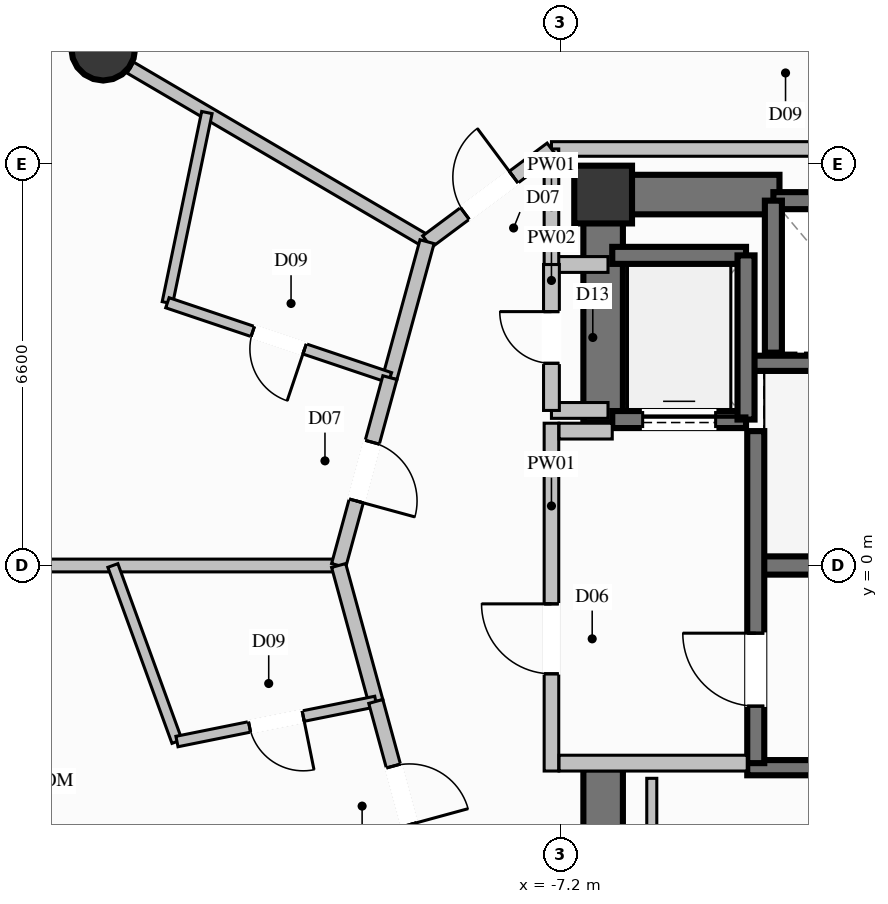
"""IFC4 building model, lengths in metres.
Left out: names, types, materials, properties, quantities, classifications, styles, units other than length and angle.
Written with IfcOpenShell. Run it as: python <this file> out.ifc"""

import sys

from ifc_helpers import new_model, si_unit, direction, frame, frame_2d, origin, origin_2d, place, context, subcontext, project, spatial, rectangle, circle, extrude, element, fill, save


model = new_model("IFC4")
c1 = context("Model", 3, precision=1e-05, world=origin(), true_north=direction((0.0, 1.0)))
c2 = subcontext(c1, "Body", "Model", "MODEL_VIEW")
j1 = project(units=[si_unit("LENGTHUNIT", "METRE"), si_unit("PLANEANGLEUNIT", "RADIAN")], contexts=[c1])
p1 = place(None, origin())
s1 = spatial("IfcSite", under=j1, at=p1, CompositionType="ELEMENT")
p2 = place(p1, origin())
s2 = spatial("IfcBuilding", under=s1, at=p2, CompositionType="ELEMENT")
p3 = place(p2, frame((0.0, 0.0, 102.6)))
s3 = spatial("IfcBuildingStorey", under=s2, at=p3, CompositionType="ELEMENT", Elevation=102.6)
p4 = place(p3, frame((-6.5, 6.1, 0.0), z_axis=(0.0, 0.0, 1.0), x_axis=(1.0, 0.0, 0.0)))
e1 = element("IfcColumn", 1, at=p4, inside=s3, PredefinedType="COLUMN", context=c2, shape_type="SweptSolid", body=[
    extrude(rectangle(XDim=0.95, YDim=0.95, at=origin_2d()), origin(), (0.0, 0.0, 1.0), 3.6),
])
p5 = place(p3, frame((-3.99, 0.0, 0.0), z_axis=(0.0, 0.0, 1.0), x_axis=(1.0, 0.0, 0.0)))
e2 = element("IfcWall", 2, at=p5, inside=s3, PredefinedType="SHEAR", context=c2, shape_type="SweptSolid", body=[
    extrude(rectangle(XDim=7.98, YDim=0.3, at=frame_2d((3.99, 0.0))), origin(), (0.0, 0.0, 1.0), 3.6),
])
for number, where, z_axis, x_axis in (
    (3, (-4.13, -3.325, 0.0), (0.0, 0.0, 1.0), (1.0, 0.0, 0.0)),
    (4, (-4.13, 3.325, 0.0), (0.0, 0.0, 1.0), (1.0, 0.0, 0.0)),
):
    element("IfcWall", number, at=place(p3, frame(where, z_axis=z_axis, x_axis=x_axis)), inside=s3, PredefinedType="SOLIDWALL", context=c2, shape_type="SweptSolid", body=[
        extrude(rectangle(XDim=8.26, YDim=0.25, at=frame_2d((4.13, 0.0))), origin(), (0.0, 0.0, 1.0), 3.6),
    ])
p6 = place(p3, frame((-6.175, 6.1, 0.0), z_axis=(0.0, 0.0, 1.0), x_axis=(1.0, 0.0, 0.0)))
e5 = element("IfcWall", 5, at=p6, inside=s3, PredefinedType="SHEAR", context=c2, shape_type="SweptSolid", body=[
    extrude(rectangle(XDim=2.575, YDim=0.65, at=frame_2d((1.288, 0.0))), origin(), (0.0, 0.0, 1.0), 3.6),
])
p7 = place(p3, frame((-6.5, 2.35, 0.0), z_axis=(0.0, 0.0, 1.0), x_axis=(0.0, 1.0, 0.0)))
e6 = element("IfcWall", 6, at=p7, inside=s3, PredefinedType="SHEAR", context=c2, shape_type="SweptSolid", body=[
    extrude(rectangle(XDim=4.075, YDim=0.65, at=frame_2d((2.038, 0.0))), origin(), (0.0, 0.0, 1.0), 3.6),
])
p8 = place(p3, frame((-6.5, -6.425, 0.0), z_axis=(0.0, 0.0, 1.0), x_axis=(0.0, 1.0, 0.0)))
e7 = element("IfcWall", 7, at=p8, inside=s3, PredefinedType="SHEAR", context=c2, shape_type="SweptSolid", body=[
    extrude(rectangle(XDim=3.075, YDim=0.65, at=frame_2d((1.538, 0.0))), origin(), (0.0, 0.0, 1.0), 3.6),
])
p9 = place(p3, frame((-14.722, 8.5, 0.0), z_axis=(0.0, 0.0, 1.0), x_axis=(1.0, 0.0, 0.0)))
e8 = element("IfcColumn", 8, at=p9, inside=s3, PredefinedType="COLUMN", context=c2, shape_type="SweptSolid", body=[
    extrude(circle(Radius=0.525, at=origin_2d()), origin(), (0.0, 0.0, 1.0), 3.6),
])
p10 = place(p3, frame((-1.6, 6.0, 0.0), z_axis=(0.0, 0.0, 1.0), x_axis=(-1.0, 0.0, 0.0)))
e9 = element("IfcWall", 9, at=p10, inside=s3, PredefinedType="SOLIDWALL", context=c2, shape_type="SweptSolid", body=[
    extrude(rectangle(XDim=2.1, YDim=0.28, at=frame_2d((1.05, 0.0))), origin(), (0.0, 0.0, 1.0), 3.35),
])
p11 = place(p3, frame((-3.7, 6.0, 0.0), z_axis=(0.0, 0.0, 1.0), x_axis=(0.0, -1.0, 0.0)))
e10 = element("IfcWall", 10, at=p11, inside=s3, PredefinedType="SOLIDWALL", context=c2, shape_type="SweptSolid", body=[
    extrude(rectangle(XDim=2.5, YDim=0.28, at=frame_2d((1.25, 0.0))), origin(), (0.0, 0.0, 1.0), 3.35),
])
p12 = place(p3, frame((-6.35, 2.4, 0.0), z_axis=(0.0, 0.0, 1.0), x_axis=(1.0, 0.0, 0.0)))
e11 = element("IfcWall", 11, at=p12, inside=s3, PredefinedType="SOLIDWALL", context=c2, shape_type="SweptSolid", body=[
    extrude(rectangle(XDim=2.2, YDim=0.28, at=frame_2d((1.1, 0.0))), origin(), (0.0, 0.0, 1.0), 3.35),
])
p13 = place(p12, frame((0.5, 0.0, 0.0)))
e12 = element("IfcOpeningElement", 12, at=p13, cuts=e11, PredefinedType="OPENING", context=c2, shape_type="SweptSolid", body=[
    extrude(rectangle(XDim=1.2, YDim=2.2, at=frame_2d((0.6, 1.1))), frame((0.0, 0.15, 0.0), z_axis=(0.0, -1.0, 0.0), x_axis=(1.0, 0.0, 0.0)), (0.0, 0.0, 1.0), 0.3),
])
p14 = place(p3, frame((-4.15, 5.1, 0.0), z_axis=(0.0, 0.0, 1.0), x_axis=(-1.0, 0.0, 0.0)))
e13 = element("IfcWall", 13, at=p14, inside=s3, PredefinedType="SOLIDWALL", context=c2, shape_type="SweptSolid", body=[
    extrude(rectangle(XDim=2.2, YDim=0.28, at=frame_2d((1.1, 0.0))), origin(), (0.0, 0.0, 1.0), 3.35),
])
p15 = place(p3, frame((-4.15, 2.4, 0.0), z_axis=(0.0, 0.0, 1.0), x_axis=(0.0, 1.0, 0.0)))
e14 = element("IfcWall", 14, at=p15, inside=s3, PredefinedType="SOLIDWALL", context=c2, shape_type="SweptSolid", body=[
    extrude(rectangle(XDim=2.7, YDim=0.28, at=frame_2d((1.35, 0.0))), origin(), (0.0, 0.0, 1.0), 3.35),
])
p16 = place(p3, frame((-3.99, -3.25, 0.0), z_axis=(0.0, 0.0, 1.0), x_axis=(0.0, 1.0, 0.0)))
e15 = element("IfcWall", 15, at=p16, inside=s3, PredefinedType="SOLIDWALL", context=c2, shape_type="SweptSolid", body=[
    extrude(rectangle(XDim=5.46, YDim=0.28, at=frame_2d((2.73, 0.0))), origin(), (0.0, 0.0, 1.0), 3.35),
])
p17 = place(p16, frame((0.937, 0.0, 0.0)))
e16 = element("IfcOpeningElement", 16, at=p17, cuts=e15, PredefinedType="OPENING", context=c2, shape_type="SweptSolid", body=[
    extrude(rectangle(XDim=1.2, YDim=2.2, at=frame_2d((0.6, 1.1))), frame((0.0, 0.15, 0.0), z_axis=(0.0, -1.0, 0.0), x_axis=(1.0, 0.0, 0.0)), (0.0, 0.0, 1.0), 0.3),
])
p18 = place(p3, frame((-7.35, -3.38, 0.0), z_axis=(0.0, 0.0, 1.0), x_axis=(0.0, 1.0, 0.0)))
e17 = element("IfcWall", 17, at=p18, inside=s3, PredefinedType="PARTITIONING", context=c2, shape_type="SweptSolid", body=[
    extrude(rectangle(XDim=5.72, YDim=0.24, at=frame_2d((2.86, 0.0))), origin(), (0.0, 0.0, 1.0), 2.435),
])
p19 = place(p18, frame((1.599, 0.0, 0.0)))
e18 = element("IfcOpeningElement", 18, at=p19, cuts=e17, PredefinedType="OPENING", context=c2, shape_type="SweptSolid", body=[
    extrude(rectangle(XDim=1.15, YDim=2.2, at=frame_2d((0.575, 1.1))), frame((0.0, 0.13, 0.0), z_axis=(0.0, -1.0, 0.0), x_axis=(1.0, 0.0, 0.0)), (0.0, 0.0, 1.0), 0.26),
])
p20 = place(p3, frame((-7.225, -3.25, 0.0), z_axis=(0.0, 0.0, 1.0), x_axis=(1.0, 0.0, 0.0)))
e19 = element("IfcWall", 19, at=p20, inside=s3, PredefinedType="PARTITIONING", context=c2, shape_type="SweptSolid", body=[
    extrude(rectangle(XDim=3.095, YDim=0.26, at=frame_2d((1.548, 0.0))), origin(), (0.0, 0.0, 1.0), 3.35),
])
p21 = place(p3, frame((-7.225, 2.21, 0.0), z_axis=(0.0, 0.0, 1.0), x_axis=(1.0, 0.0, 0.0)))
e20 = element("IfcWall", 20, at=p21, inside=s3, PredefinedType="PARTITIONING", context=c2, shape_type="SweptSolid", body=[
    extrude(rectangle(XDim=0.875, YDim=0.26, at=frame_2d((0.438, 0.0))), origin(), (0.0, 0.0, 1.0), 3.35),
])
for number, where, z_axis, x_axis in (
    (21, (-7.35, 4.95, 0.0), (0.0, 0.0, 1.0), (1.0, 0.0, 0.0)),
    (22, (-7.35, 2.55, 0.0), (0.0, 0.0, 1.0), (1.0, 0.0, 0.0)),
):
    element("IfcWall", number, at=place(p3, frame(where, z_axis=z_axis, x_axis=x_axis)), inside=s3, PredefinedType="PARTITIONING", context=c2, shape_type="SweptSolid", body=[
        extrude(rectangle(XDim=0.93, YDim=0.26, at=frame_2d((0.465, 0.0))), origin(), (0.0, 0.0, 1.0), 3.35),
    ])
p22 = place(p3, frame((-7.35, 2.55, 0.0), z_axis=(0.0, 0.0, 1.0), x_axis=(0.0, 1.0, 0.0)))
e23 = element("IfcWall", 23, at=p22, inside=s3, PredefinedType="PARTITIONING", context=c2, shape_type="SweptSolid", body=[
    extrude(rectangle(XDim=2.4, YDim=0.26, at=frame_2d((1.2, 0.0))), origin(), (0.0, 0.0, 1.0), 2.435),
])
p23 = place(p22, frame((0.775, 0.0, 0.0)))
e24 = element("IfcOpeningElement", 24, at=p23, cuts=e23, PredefinedType="OPENING", context=c2, shape_type="SweptSolid", body=[
    extrude(rectangle(XDim=0.85, YDim=2.05, at=frame_2d((0.425, 1.025))), frame((0.0, 0.14, 0.0), z_axis=(0.0, -1.0, 0.0), x_axis=(1.0, 0.0, 0.0)), (0.0, 0.0, 1.0), 0.28),
])
p24 = place(p3, frame((-7.35, 6.85, 0.0), z_axis=(0.0, 0.0, 1.0), x_axis=(1.0, 0.0, 0.0)))
e25 = element("IfcWall", 25, at=p24, inside=s3, PredefinedType="PARTITIONING", context=c2, shape_type="SweptSolid", body=[
    extrude(rectangle(XDim=14.7, YDim=0.24, at=frame_2d((7.35, 0.0))), origin(), (0.0, 0.0, 1.0), 2.435),
])
p25 = place(p3, frame((-7.35, 4.95, 0.0), z_axis=(0.0, 0.0, 1.0), x_axis=(0.0, 1.0, 0.0)))
e26 = element("IfcWall", 26, at=p25, inside=s3, PredefinedType="PARTITIONING", context=c2, shape_type="SweptSolid", body=[
    extrude(rectangle(XDim=1.9, YDim=0.24, at=frame_2d((0.95, 0.0))), origin(), (0.0, 0.0, 1.0), 2.435),
])
p26 = place(p3, frame((-5.7, -3.5, 0.0), z_axis=(0.0, 0.0, 1.0), x_axis=(0.0, -1.0, 0.0)))
e27 = element("IfcWall", 27, at=p26, inside=s3, PredefinedType="PARTITIONING", context=c2, shape_type="SweptSolid", body=[
    extrude(rectangle(XDim=3.35, YDim=0.165, at=frame_2d((1.675, 0.0))), origin(), (0.0, 0.0, 1.0), 2.435),
])
p27 = place(p3, frame((-9.396, 5.325, 0.0), z_axis=(0.0, 0.0, 1.0), x_axis=(-0.862467386777, 0.50611264235, 0.0)))
e28 = element("IfcWall", 28, at=p27, inside=s3, PredefinedType="PARTITIONING", context=c2, shape_type="SweptSolid", body=[
    extrude(rectangle(XDim=5.657, YDim=0.21, at=frame_2d((2.829, 0.0))), origin(), (0.0, 0.0, 1.0), 2.791),
])
p28 = place(p3, frame((-10.85, 0.0, 0.0), z_axis=(0.0, 0.0, 1.0), x_axis=(-1.0, 0.0, 0.0)))
e29 = element("IfcWall", 29, at=p28, inside=s3, PredefinedType="PARTITIONING", context=c2, shape_type="SweptSolid", body=[
    extrude(rectangle(XDim=5.605, YDim=0.21, at=frame_2d((2.802, 0.0))), origin(), (0.0, 0.0, 1.0), 3.35),
])
p29 = place(p3, frame((-3.584, 9.865, 0.0), z_axis=(0.0, 0.0, 1.0), x_axis=(0.404626310395, -0.914482120621, 0.0)))
e30 = element("IfcWall", 30, at=p29, inside=s3, PredefinedType="PLUMBINGWALL", context=c2, shape_type="SweptSolid", body=[
    extrude(rectangle(XDim=3.297, YDim=0.175, at=frame_2d((1.648, 0.0))), origin(), (0.0, 0.0, 1.0), 3.35),
])
p30 = place(p29, frame((1.198, 0.0, 0.0)))
e31 = element("IfcOpeningElement", 31, at=p30, cuts=e30, PredefinedType="OPENING", context=c2, shape_type="SweptSolid", body=[
    extrude(rectangle(XDim=0.9, YDim=2.1, at=frame_2d((0.45, 1.05))), frame((0.0, 0.098, 0.0), z_axis=(0.0, -1.0, 0.0), x_axis=(1.0, 0.0, 0.0)), (0.0, 0.0, 1.0), 0.195),
])
p31 = place(p3, frame((-9.396, 5.325, 0.0), z_axis=(0.0, 0.0, 1.0), x_axis=(0.8017416961, 0.597670689205, 0.0)))
e32 = element("IfcWall", 32, at=p31, inside=s3, PredefinedType="PARTITIONING", context=c2, shape_type="SweptSolid", body=[
    extrude(rectangle(XDim=2.552, YDim=0.24, at=frame_2d((1.276, 0.0))), origin(), (0.0, 0.0, 1.0), 3.35),
])
p32 = place(p31, frame((0.776, 0.0, 0.0)))
e33 = element("IfcOpeningElement", 33, at=p32, cuts=e32, PredefinedType="OPENING", context=c2, shape_type="SweptSolid", body=[
    extrude(rectangle(XDim=1.0, YDim=2.2, at=frame_2d((0.5, 1.1))), frame((0.0, 0.13, 0.0), z_axis=(0.0, -1.0, 0.0), x_axis=(1.0, 0.0, 0.0)), (0.0, 0.0, 1.0), 0.26),
])
p33 = place(p3, frame((-9.396, 5.325, 0.0), z_axis=(0.0, 0.0, 1.0), x_axis=(-0.263643210908, -0.964620265878, 0.0)))
e34 = element("IfcWall", 34, at=p33, inside=s3, PredefinedType="PARTITIONING", context=c2, shape_type="SweptSolid", body=[
    extrude(rectangle(XDim=2.318, YDim=0.24, at=frame_2d((1.159, 0.0))), origin(), (0.0, 0.0, 1.0), 3.35),
])
p34 = place(p3, frame((-13.017, 7.449, 0.0), z_axis=(0.0, 0.0, 1.0), x_axis=(-0.203136275653, -0.979150475419, 0.0)))
e35 = element("IfcWall", 35, at=p34, inside=s3, PredefinedType="PLUMBINGWALL", context=c2, shape_type="SweptSolid", body=[
    extrude(rectangle(XDim=3.195, YDim=0.175, at=frame_2d((1.597, 0.0))), origin(), (0.0, 0.0, 1.0), 3.35),
])
p35 = place(p3, frame((-10.007, 3.089, 0.0), z_axis=(0.0, 0.0, 1.0), x_axis=(-0.947724103288, 0.319090933822, 0.0)))
e36 = element("IfcWall", 36, at=p35, inside=s3, PredefinedType="PLUMBINGWALL", context=c2, shape_type="SweptSolid", body=[
    extrude(rectangle(XDim=3.861, YDim=0.175, at=frame_2d((1.93, 0.0))), origin(), (0.0, 0.0, 1.0), 3.35),
])
p36 = place(p35, frame((1.48, 0.0, 0.0)))
e37 = element("IfcOpeningElement", 37, at=p36, cuts=e36, PredefinedType="OPENING", context=c2, shape_type="SweptSolid", body=[
    extrude(rectangle(XDim=0.9, YDim=2.1, at=frame_2d((0.45, 1.05))), frame((0.0, 0.098, 0.0), z_axis=(0.0, -1.0, 0.0), x_axis=(1.0, 0.0, 0.0)), (0.0, 0.0, 1.0), 0.195),
])
p37 = place(p3, frame((-10.007, 3.089, 0.0), z_axis=(0.0, 0.0, 1.0), x_axis=(-0.263272237376, -0.964721581093, 0.0)))
e38 = element("IfcWall", 38, at=p37, inside=s3, PredefinedType="PARTITIONING", context=c2, shape_type="SweptSolid", body=[
    extrude(rectangle(XDim=3.202, YDim=0.24, at=frame_2d((1.601, 0.0))), origin(), (0.0, 0.0, 1.0), 3.35),
])
p38 = place(p37, frame((1.101, 0.0, 0.0)))
e39 = element("IfcOpeningElement", 39, at=p38, cuts=e38, PredefinedType="OPENING", context=c2, shape_type="SweptSolid", body=[
    extrude(rectangle(XDim=1.0, YDim=2.2, at=frame_2d((0.5, 1.1))), frame((0.0, 0.13, 0.0), z_axis=(0.0, -1.0, 0.0), x_axis=(1.0, 0.0, 0.0)), (0.0, 0.0, 1.0), 0.26),
])
p39 = place(p3, frame((-10.85, 0.0, 0.0), z_axis=(0.0, 0.0, 1.0), x_axis=(0.263616426241, -0.964627586074, 0.0)))
e40 = element("IfcWall", 40, at=p39, inside=s3, PredefinedType="PARTITIONING", context=c2, shape_type="SweptSolid", body=[
    extrude(rectangle(XDim=2.318, YDim=0.24, at=frame_2d((1.159, 0.0))), origin(), (0.0, 0.0, 1.0), 3.35),
])
p40 = place(p3, frame((-14.563, 0.0, 0.0), z_axis=(0.0, 0.0, 1.0), x_axis=(0.342092982083, -0.939666106449, 0.0)))
e41 = element("IfcWall", 41, at=p40, inside=s3, PredefinedType="PLUMBINGWALL", context=c2, shape_type="SweptSolid", body=[
    extrude(rectangle(XDim=3.081, YDim=0.175, at=frame_2d((1.541, 0.0))), origin(), (0.0, 0.0, 1.0), 3.35),
])
p41 = place(p3, frame((-10.239, -2.236, 0.0), z_axis=(0.0, 0.0, 1.0), x_axis=(-0.980295333609, -0.197537487338, 0.0)))
e42 = element("IfcWall", 42, at=p41, inside=s3, PredefinedType="PLUMBINGWALL", context=c2, shape_type="SweptSolid", body=[
    extrude(rectangle(XDim=3.336, YDim=0.175, at=frame_2d((1.668, 0.0))), origin(), (0.0, 0.0, 1.0), 3.35),
])
p42 = place(p41, frame((1.218, 0.0, 0.0)))
e43 = element("IfcOpeningElement", 43, at=p42, cuts=e42, PredefinedType="OPENING", context=c2, shape_type="SweptSolid", body=[
    extrude(rectangle(XDim=0.9, YDim=2.1, at=frame_2d((0.45, 1.05))), frame((0.0, 0.098, 0.0), z_axis=(0.0, -1.0, 0.0), x_axis=(1.0, 0.0, 0.0)), (0.0, 0.0, 1.0), 0.195),
])
p43 = place(p3, frame((-10.239, -2.236, 0.0), z_axis=(0.0, 0.0, 1.0), x_axis=(0.26329160366, -0.964716295831, 0.0)))
e44 = element("IfcWall", 44, at=p43, inside=s3, PredefinedType="PARTITIONING", context=c2, shape_type="SweptSolid", body=[
    extrude(rectangle(XDim=3.202, YDim=0.24, at=frame_2d((1.601, 0.0))), origin(), (0.0, 0.0, 1.0), 3.35),
])
p44 = place(p43, frame((1.101, 0.0, 0.0)))
e45 = element("IfcOpeningElement", 45, at=p44, cuts=e44, PredefinedType="OPENING", context=c2, shape_type="SweptSolid", body=[
    extrude(rectangle(XDim=1.0, YDim=2.2, at=frame_2d((0.5, 1.1))), frame((0.0, 0.13, 0.0), z_axis=(0.0, -1.0, 0.0), x_axis=(1.0, 0.0, 0.0)), (0.0, 0.0, 1.0), 0.26),
])
p45 = place(p13, origin())
e46 = element("IfcDoor", 46, at=p45, inside=s3, OperationType="SLIDING_TO_LEFT", PredefinedType="DOOR", context=c2, shape_type="SweptSolid", body=[
    extrude(rectangle(XDim=1.2, YDim=2.2, at=frame_2d((0.6, 1.1))), frame((0.0, 0.025, 0.0), z_axis=(0.0, -1.0, 0.0), x_axis=(1.0, 0.0, 0.0)), (0.0, 0.0, 1.0), 0.05),
])
fill(e12, e46)
p46 = place(p17, origin())
e47 = element("IfcDoor", 47, at=p46, inside=s3, OperationType="SINGLE_SWING_RIGHT", PredefinedType="DOOR", context=c2, shape_type="SweptSolid", body=[
    extrude(rectangle(XDim=1.2, YDim=2.2, at=frame_2d((0.6, 1.1))), frame((0.0, 0.025, 0.0), z_axis=(0.0, -1.0, 0.0), x_axis=(1.0, 0.0, 0.0)), (0.0, 0.0, 1.0), 0.05),
])
fill(e16, e47)
p47 = place(p19, origin())
e48 = element("IfcDoor", 48, at=p47, inside=s3, OperationType="SINGLE_SWING_RIGHT", PredefinedType="DOOR", context=c2, shape_type="SweptSolid", body=[
    extrude(rectangle(XDim=1.15, YDim=2.2, at=frame_2d((0.575, 1.1))), frame((0.0, 0.025, 0.0), z_axis=(0.0, -1.0, 0.0), x_axis=(1.0, 0.0, 0.0)), (0.0, 0.0, 1.0), 0.05),
])
fill(e18, e48)
p48 = place(p23, origin())
e49 = element("IfcDoor", 49, at=p48, inside=s3, OperationType="SINGLE_SWING_RIGHT", PredefinedType="DOOR", context=c2, shape_type="SweptSolid", body=[
    extrude(rectangle(XDim=0.85, YDim=2.05, at=frame_2d((0.425, 1.025))), frame((0.0, 0.025, 0.0), z_axis=(0.0, -1.0, 0.0), x_axis=(1.0, 0.0, 0.0)), (0.0, 0.0, 1.0), 0.05),
])
fill(e24, e49)
p49 = place(p32, origin())
e50 = element("IfcDoor", 50, at=p49, inside=s3, OperationType="SINGLE_SWING_RIGHT", PredefinedType="DOOR", context=c2, shape_type="SweptSolid", body=[
    extrude(rectangle(XDim=1.0, YDim=2.2, at=frame_2d((0.5, 1.1))), frame((0.0, 0.025, 0.0), z_axis=(0.0, -1.0, 0.0), x_axis=(1.0, 0.0, 0.0)), (0.0, 0.0, 1.0), 0.05),
])
fill(e33, e50)
p50 = place(p36, origin())
e51 = element("IfcDoor", 51, at=p50, inside=s3, OperationType="SINGLE_SWING_LEFT", PredefinedType="DOOR", context=c2, shape_type="SweptSolid", body=[
    extrude(rectangle(XDim=0.9, YDim=2.1, at=frame_2d((0.45, 1.05))), frame((0.0, 0.025, 0.0), z_axis=(0.0, -1.0, 0.0), x_axis=(1.0, 0.0, 0.0)), (0.0, 0.0, 1.0), 0.05),
])
fill(e37, e51)
p51 = place(p38, origin())
e52 = element("IfcDoor", 52, at=p51, inside=s3, OperationType="SINGLE_SWING_RIGHT", PredefinedType="DOOR", context=c2, shape_type="SweptSolid", body=[
    extrude(rectangle(XDim=1.0, YDim=2.2, at=frame_2d((0.5, 1.1))), frame((0.0, 0.025, 0.0), z_axis=(0.0, -1.0, 0.0), x_axis=(1.0, 0.0, 0.0)), (0.0, 0.0, 1.0), 0.05),
])
fill(e39, e52)
p52 = place(p42, origin())
e53 = element("IfcDoor", 53, at=p52, inside=s3, OperationType="SINGLE_SWING_LEFT", PredefinedType="DOOR", context=c2, shape_type="SweptSolid", body=[
    extrude(rectangle(XDim=0.9, YDim=2.1, at=frame_2d((0.45, 1.05))), frame((0.0, 0.025, 0.0), z_axis=(0.0, -1.0, 0.0), x_axis=(1.0, 0.0, 0.0)), (0.0, 0.0, 1.0), 0.05),
])
fill(e43, e53)
p53 = place(p44, origin())
e54 = element("IfcDoor", 54, at=p53, inside=s3, OperationType="SINGLE_SWING_RIGHT", PredefinedType="DOOR", context=c2, shape_type="SweptSolid", body=[
    extrude(rectangle(XDim=1.0, YDim=2.2, at=frame_2d((0.5, 1.1))), frame((0.0, 0.025, 0.0), z_axis=(0.0, -1.0, 0.0), x_axis=(1.0, 0.0, 0.0)), (0.0, 0.0, 1.0), 0.05),
])
fill(e45, e54)
save(model, sys.argv[1])
